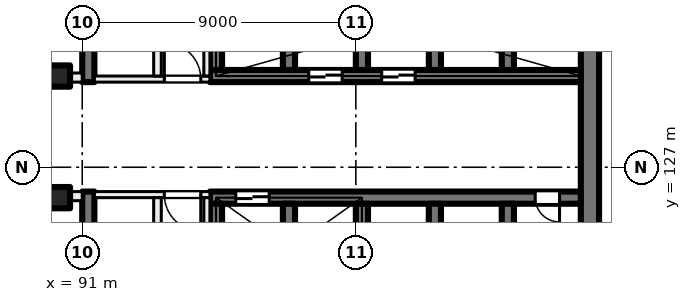
"""IFC4 building model, lengths in metres.
Left out: names, types, materials, properties, quantities, classifications, styles, units other than length and angle.
Written with IfcOpenShell. Run it as: python <this file> out.ifc"""

import sys

from ifc_helpers import new_model, si_unit, direction, frame, frame_2d, origin, origin_2d, place, context, subcontext, project, spatial, rectangle, extrude, element, fill, save


model = new_model("IFC4")
c1 = context("Model", 3, precision=1e-05, world=origin(), true_north=direction((0.0, 1.0)))
c2 = subcontext(c1, "Body", "Model", "MODEL_VIEW")
j1 = project(units=[si_unit("LENGTHUNIT", "METRE"), si_unit("PLANEANGLEUNIT", "RADIAN")], contexts=[c1])
p1 = place(None, origin())
s1 = spatial("IfcSite", under=j1, at=p1, CompositionType="ELEMENT")
p2 = place(p1, origin())
s2 = spatial("IfcBuilding", under=s1, at=p2, CompositionType="ELEMENT")
p3 = place(p2, frame((0.0, 0.0, 27.5)))
s3 = spatial("IfcBuildingStorey", under=s2, at=p3, CompositionType="ELEMENT", Elevation=27.5)
for number, where, z_axis, x_axis in (
    (1, (90.25, 130.0, 0.0), (0.0, 0.0, 1.0), (1.0, 0.0, 0.0)),
    (2, (90.25, 126.0, 0.0), (0.0, 0.0, 1.0), (1.0, 0.0, 0.0)),
):
    element("IfcColumn", number, at=place(p3, frame(where, z_axis=z_axis, x_axis=x_axis)), inside=s3, PredefinedType="COLUMN", context=c2, shape_type="SweptSolid", body=[
        extrude(rectangle(XDim=0.7, YDim=0.7, at=origin_2d()), origin(), (0.0, 0.0, 1.0), 4.0),
    ])
p4 = place(p3, frame((107.7, 135.2, 0.0), z_axis=(0.0, 0.0, 1.0), x_axis=(0.0, -1.0, 0.0)))
e3 = element("IfcWall", 3, at=p4, inside=s3, PredefinedType="SHEAR", context=c2, shape_type="SweptSolid", body=[
    extrude(rectangle(XDim=14.4, YDim=0.6, at=frame_2d((7.2, 0.0))), origin(), (0.0, 0.0, 1.0), 4.0),
])
p5 = place(p3, frame((107.4, 130.0, 0.0), z_axis=(0.0, 0.0, 1.0), x_axis=(-1.0, 0.0, 0.0)))
e4 = element("IfcWall", 4, at=p5, inside=s3, PredefinedType="SHEAR", context=c2, shape_type="SweptSolid", body=[
    extrude(rectangle(XDim=12.2, YDim=0.4, at=frame_2d((6.1, 0.0))), origin(), (0.0, 0.0, 1.0), 4.0),
])
p6 = place(p5, frame((5.45, 0.0, 0.0)))
e5 = element("IfcOpeningElement", 5, at=p6, cuts=e4, PredefinedType="OPENING", context=c2, shape_type="SweptSolid", body=[
    extrude(rectangle(XDim=1.1, YDim=2.1, at=frame_2d((0.55, 1.05))), frame((0.0, 0.21, 0.0), z_axis=(0.0, -1.0, 0.0), x_axis=(1.0, 0.0, 0.0)), (0.0, 0.0, 1.0), 0.42),
])
p7 = place(p5, frame((7.85, 0.0, 0.0)))
e6 = element("IfcOpeningElement", 6, at=p7, cuts=e4, PredefinedType="OPENING", context=c2, shape_type="SweptSolid", body=[
    extrude(rectangle(XDim=1.1, YDim=2.1, at=frame_2d((0.55, 1.05))), frame((0.0, 0.21, 0.0), z_axis=(0.0, -1.0, 0.0), x_axis=(1.0, 0.0, 0.0)), (0.0, 0.0, 1.0), 0.42),
])
for number, where, z_axis, x_axis in (
    (7, (105.0, 133.2, 0.0), (0.0, 0.0, 1.0), (0.0, -1.0, 0.0)),
    (8, (102.6, 133.2, 0.0), (0.0, 0.0, 1.0), (0.0, -1.0, 0.0)),
    (9, (100.2, 133.2, 0.0), (0.0, 0.0, 1.0), (0.0, -1.0, 0.0)),
    (10, (97.8, 133.2, 0.0), (0.0, 0.0, 1.0), (0.0, -1.0, 0.0)),
    (11, (95.4, 133.2, 0.0), (0.0, 0.0, 1.0), (0.0, -1.0, 0.0)),
):
    element("IfcWall", number, at=place(p3, frame(where, z_axis=z_axis, x_axis=x_axis)), inside=s3, PredefinedType="SHEAR", context=c2, shape_type="SweptSolid", body=[
        extrude(rectangle(XDim=3.0, YDim=0.4, at=frame_2d((1.5, 0.0))), origin(), (0.0, 0.0, 1.0), 4.0),
    ])
p8 = place(p3, frame((107.4, 126.0, 0.0), z_axis=(0.0, 0.0, 1.0), x_axis=(-1.0, 0.0, 0.0)))
e12 = element("IfcWall", 12, at=p8, inside=s3, PredefinedType="SHEAR", context=c2, shape_type="SweptSolid", body=[
    extrude(rectangle(XDim=12.2, YDim=0.4, at=frame_2d((6.1, 0.0))), origin(), (0.0, 0.0, 1.0), 4.0),
])
p9 = place(p8, frame((10.25, 0.0, 0.0)))
e13 = element("IfcOpeningElement", 13, at=p9, cuts=e12, PredefinedType="OPENING", context=c2, shape_type="SweptSolid", body=[
    extrude(rectangle(XDim=1.1, YDim=2.1, at=frame_2d((0.55, 1.05))), frame((0.0, 0.21, 0.0), z_axis=(0.0, -1.0, 0.0), x_axis=(1.0, 0.0, 0.0)), (0.0, 0.0, 1.0), 0.42),
])
p10 = place(p8, frame((0.7, 0.0, 0.0)))
e14 = element("IfcOpeningElement", 14, at=p10, cuts=e12, PredefinedType="OPENING", context=c2, shape_type="SweptSolid", body=[
    extrude(rectangle(XDim=0.8, YDim=2.1, at=frame_2d((0.4, 1.05))), frame((0.0, 0.21, 0.0), z_axis=(0.0, -1.0, 0.0), x_axis=(1.0, 0.0, 0.0)), (0.0, 0.0, 1.0), 0.42),
])
for number, where, z_axis, x_axis in (
    (15, (105.0, 125.8, 0.0), (0.0, 0.0, 1.0), (0.0, -1.0, 0.0)),
    (16, (102.6, 125.8, 0.0), (0.0, 0.0, 1.0), (0.0, -1.0, 0.0)),
    (17, (100.2, 125.8, 0.0), (0.0, 0.0, 1.0), (0.0, -1.0, 0.0)),
    (18, (97.8, 125.8, 0.0), (0.0, 0.0, 1.0), (0.0, -1.0, 0.0)),
    (19, (95.4, 125.8, 0.0), (0.0, 0.0, 1.0), (0.0, -1.0, 0.0)),
):
    element("IfcWall", number, at=place(p3, frame(where, z_axis=z_axis, x_axis=x_axis)), inside=s3, PredefinedType="SHEAR", context=c2, shape_type="SweptSolid", body=[
        extrude(rectangle(XDim=3.0, YDim=0.4, at=frame_2d((1.5, 0.0))), origin(), (0.0, 0.0, 1.0), 4.0),
    ])
for number, where, z_axis, x_axis in (
    (20, (91.2, 138.4, 0.0), (0.0, 0.0, 1.0), (0.0, -1.0, 0.0)),
    (21, (91.2, 126.2, 0.0), (0.0, 0.0, 1.0), (0.0, -1.0, 0.0)),
):
    element("IfcWall", number, at=place(p3, frame(where, z_axis=z_axis, x_axis=x_axis)), inside=s3, PredefinedType="SHEAR", context=c2, shape_type="SweptSolid", body=[
        extrude(rectangle(XDim=8.6, YDim=0.4, at=frame_2d((4.3, 0.0))), origin(), (0.0, 0.0, 1.0), 4.0),
    ])
p11 = place(p3, frame((95.2, 126.1, 0.0), z_axis=(0.0, 0.0, 1.0), x_axis=(-1.0, 0.0, 0.0)))
e22 = element("IfcWall", 22, at=p11, inside=s3, PredefinedType="PARTITIONING", context=c2, shape_type="SweptSolid", body=[
    extrude(rectangle(XDim=3.8, YDim=0.2, at=frame_2d((1.9, 0.0))), origin(), (0.0, 0.0, 1.0), 3.625),
])
p12 = place(p11, frame((0.3, 0.0, 0.0)))
e23 = element("IfcOpeningElement", 23, at=p12, cuts=e22, PredefinedType="OPENING", context=c2, shape_type="SweptSolid", body=[
    extrude(rectangle(XDim=1.2, YDim=2.1, at=frame_2d((0.6, 1.05))), frame((0.0, 0.11, 0.0), z_axis=(0.0, -1.0, 0.0), x_axis=(1.0, 0.0, 0.0)), (0.0, 0.0, 1.0), 0.22),
])
p13 = place(p3, frame((95.1, 117.6, 0.0), z_axis=(0.0, 0.0, 1.0), x_axis=(0.0, 1.0, 0.0)))
e24 = element("IfcWall", 24, at=p13, inside=s3, PredefinedType="PARTITIONING", context=c2, shape_type="SweptSolid", body=[
    extrude(rectangle(XDim=8.4, YDim=0.2, at=frame_2d((4.2, 0.0))), origin(), (0.0, 0.0, 1.0), 3.625),
])
p14 = place(p13, frame((1.65, 0.0, 0.0)))
e25 = element("IfcOpeningElement", 25, at=p14, cuts=e24, PredefinedType="OPENING", context=c2, shape_type="SweptSolid", body=[
    extrude(rectangle(XDim=1.5, YDim=2.1, at=frame_2d((0.75, 1.05))), frame((0.0, 0.11, 0.0), z_axis=(0.0, -1.0, 0.0), x_axis=(1.0, 0.0, 0.0)), (0.0, 0.0, 1.0), 0.22),
])
p15 = place(p3, frame((93.475, 117.6, 0.0), z_axis=(0.0, 0.0, 1.0), x_axis=(0.0, 1.0, 0.0)))
e26 = element("IfcWall", 26, at=p15, inside=s3, PredefinedType="PARTITIONING", context=c2, shape_type="SweptSolid", body=[
    extrude(rectangle(XDim=8.4, YDim=0.25, at=frame_2d((4.2, 0.0))), origin(), (0.0, 0.0, 1.0), 3.625),
])
p16 = place(p15, frame((3.8, 0.0, 0.0)))
e27 = element("IfcOpeningElement", 27, at=p16, cuts=e26, PredefinedType="OPENING", context=c2, shape_type="SweptSolid", body=[
    extrude(rectangle(XDim=0.8, YDim=2.1, at=frame_2d((0.4, 1.05))), frame((0.0, 0.135, 0.0), z_axis=(0.0, -1.0, 0.0), x_axis=(1.0, 0.0, 0.0)), (0.0, 0.0, 1.0), 0.27),
])
p17 = place(p3, frame((91.4, 129.9, 0.0), z_axis=(0.0, 0.0, 1.0), x_axis=(1.0, 0.0, 0.0)))
e28 = element("IfcWall", 28, at=p17, inside=s3, PredefinedType="PARTITIONING", context=c2, shape_type="SweptSolid", body=[
    extrude(rectangle(XDim=3.8, YDim=0.2, at=frame_2d((1.9, 0.0))), origin(), (0.0, 0.0, 1.0), 3.625),
])
p18 = place(p17, frame((2.3, 0.0, 0.0)))
e29 = element("IfcOpeningElement", 29, at=p18, cuts=e28, PredefinedType="OPENING", context=c2, shape_type="SweptSolid", body=[
    extrude(rectangle(XDim=1.2, YDim=2.1, at=frame_2d((0.6, 1.05))), frame((0.0, 0.11, 0.0), z_axis=(0.0, -1.0, 0.0), x_axis=(1.0, 0.0, 0.0)), (0.0, 0.0, 1.0), 0.22),
])
p19 = place(p3, frame((95.1, 130.0, 0.0), z_axis=(0.0, 0.0, 1.0), x_axis=(0.0, 1.0, 0.0)))
e30 = element("IfcWall", 30, at=p19, inside=s3, PredefinedType="PARTITIONING", context=c2, shape_type="SweptSolid", body=[
    extrude(rectangle(XDim=8.4, YDim=0.2, at=frame_2d((4.2, 0.0))), origin(), (0.0, 0.0, 1.0), 3.625),
])
p20 = place(p19, frame((5.25, 0.0, 0.0)))
e31 = element("IfcOpeningElement", 31, at=p20, cuts=e30, PredefinedType="OPENING", context=c2, shape_type="SweptSolid", body=[
    extrude(rectangle(XDim=1.5, YDim=2.1, at=frame_2d((0.75, 1.05))), frame((0.0, 0.11, 0.0), z_axis=(0.0, -1.0, 0.0), x_axis=(1.0, 0.0, 0.0)), (0.0, 0.0, 1.0), 0.22),
])
p21 = place(p3, frame((93.475, 130.0, 0.0), z_axis=(0.0, 0.0, 1.0), x_axis=(0.0, 1.0, 0.0)))
e32 = element("IfcWall", 32, at=p21, inside=s3, PredefinedType="PARTITIONING", context=c2, shape_type="SweptSolid", body=[
    extrude(rectangle(XDim=8.4, YDim=0.25, at=frame_2d((4.2, 0.0))), origin(), (0.0, 0.0, 1.0), 3.625),
])
p22 = place(p21, frame((2.275, 0.0, 0.0)))
e33 = element("IfcOpeningElement", 33, at=p22, cuts=e32, PredefinedType="OPENING", context=c2, shape_type="SweptSolid", body=[
    extrude(rectangle(XDim=1.0, YDim=2.1, at=frame_2d((0.5, 1.05))), frame((0.0, 0.135, 0.0), z_axis=(0.0, -1.0, 0.0), x_axis=(1.0, 0.0, 0.0)), (0.0, 0.0, 1.0), 0.27),
])
p23 = place(p21, frame((6.525, 0.0, 0.0)))
e34 = element("IfcOpeningElement", 34, at=p23, cuts=e32, PredefinedType="OPENING", context=c2, shape_type="SweptSolid", body=[
    extrude(rectangle(XDim=1.0, YDim=2.1, at=frame_2d((0.5, 1.05))), frame((0.0, 0.135, 0.0), z_axis=(0.0, -1.0, 0.0), x_axis=(1.0, 0.0, 0.0)), (0.0, 0.0, 1.0), 0.27),
])
p24 = place(p3, frame((72.5, 129.95, 0.0), z_axis=(0.0, 0.0, 1.0), x_axis=(1.0, 0.0, 0.0)))
e35 = element("IfcWall", 35, at=p24, inside=s3, PredefinedType="PARTITIONING", context=c2, shape_type="SweptSolid", body=[
    extrude(rectangle(XDim=18.5, YDim=0.3, at=frame_2d((9.25, 0.0))), origin(), (0.0, 0.0, 1.0), 3.625),
])
p25 = place(p24, frame((9.85, 0.0, 0.0)))
e36 = element("IfcOpeningElement", 36, at=p25, cuts=e35, PredefinedType="OPENING", context=c2, shape_type="SweptSolid", body=[
    extrude(rectangle(XDim=0.8, YDim=2.1, at=frame_2d((0.4, 1.05))), frame((0.0, 0.16, 0.0), z_axis=(0.0, -1.0, 0.0), x_axis=(1.0, 0.0, 0.0)), (0.0, 0.0, 1.0), 0.32),
])
p26 = place(p24, frame((14.625, 0.0, 0.0)))
e37 = element("IfcOpeningElement", 37, at=p26, cuts=e35, PredefinedType="OPENING", context=c2, shape_type="SweptSolid", body=[
    extrude(rectangle(XDim=1.0, YDim=2.1, at=frame_2d((0.5, 1.05))), frame((0.0, 0.16, 0.0), z_axis=(0.0, -1.0, 0.0), x_axis=(1.0, 0.0, 0.0)), (0.0, 0.0, 1.0), 0.32),
])
p27 = place(p24, frame((6.0, 0.0, 0.0)))
e38 = element("IfcOpeningElement", 38, at=p27, cuts=e35, PredefinedType="OPENING", context=c2, shape_type="SweptSolid", body=[
    extrude(rectangle(XDim=1.0, YDim=2.1, at=frame_2d((0.5, 1.05))), frame((0.0, 0.16, 0.0), z_axis=(0.0, -1.0, 0.0), x_axis=(1.0, 0.0, 0.0)), (0.0, 0.0, 1.0), 0.32),
])
p28 = place(p24, frame((1.625, 0.0, 0.0)))
e39 = element("IfcOpeningElement", 39, at=p28, cuts=e35, PredefinedType="OPENING", context=c2, shape_type="SweptSolid", body=[
    extrude(rectangle(XDim=1.0, YDim=2.1, at=frame_2d((0.5, 1.05))), frame((0.0, 0.16, 0.0), z_axis=(0.0, -1.0, 0.0), x_axis=(1.0, 0.0, 0.0)), (0.0, 0.0, 1.0), 0.32),
])
p29 = place(p3, frame((91.0, 126.05, 0.0), z_axis=(0.0, 0.0, 1.0), x_axis=(-1.0, 0.0, 0.0)))
e40 = element("IfcWall", 40, at=p29, inside=s3, PredefinedType="PARTITIONING", context=c2, shape_type="SweptSolid", body=[
    extrude(rectangle(XDim=43.785, YDim=0.3, at=frame_2d((21.893, 0.0))), origin(), (0.0, 0.0, 1.0), 3.625),
])
p30 = place(p29, frame((2.125, 0.0, 0.0)))
e41 = element("IfcOpeningElement", 41, at=p30, cuts=e40, PredefinedType="OPENING", context=c2, shape_type="SweptSolid", body=[
    extrude(rectangle(XDim=1.0, YDim=2.1, at=frame_2d((0.5, 1.05))), frame((0.0, 0.16, 0.0), z_axis=(0.0, -1.0, 0.0), x_axis=(1.0, 0.0, 0.0)), (0.0, 0.0, 1.0), 0.32),
])
p31 = place(p29, frame((7.0, 0.0, 0.0)))
e42 = element("IfcOpeningElement", 42, at=p31, cuts=e40, PredefinedType="OPENING", context=c2, shape_type="SweptSolid", body=[
    extrude(rectangle(XDim=1.0, YDim=2.1, at=frame_2d((0.5, 1.05))), frame((0.0, 0.16, 0.0), z_axis=(0.0, -1.0, 0.0), x_axis=(1.0, 0.0, 0.0)), (0.0, 0.0, 1.0), 0.32),
])
p32 = place(p29, frame((11.5, 0.0, 0.0)))
e43 = element("IfcOpeningElement", 43, at=p32, cuts=e40, PredefinedType="OPENING", context=c2, shape_type="SweptSolid", body=[
    extrude(rectangle(XDim=1.0, YDim=2.1, at=frame_2d((0.5, 1.05))), frame((0.0, 0.16, 0.0), z_axis=(0.0, -1.0, 0.0), x_axis=(1.0, 0.0, 0.0)), (0.0, 0.0, 1.0), 0.32),
])
p33 = place(p29, frame((15.9, 0.0, 0.0)))
e44 = element("IfcOpeningElement", 44, at=p33, cuts=e40, PredefinedType="OPENING", context=c2, shape_type="SweptSolid", body=[
    extrude(rectangle(XDim=1.2, YDim=2.1, at=frame_2d((0.6, 1.05))), frame((0.0, 0.16, 0.0), z_axis=(0.0, -1.0, 0.0), x_axis=(1.0, 0.0, 0.0)), (0.0, 0.0, 1.0), 0.32),
])
p34 = place(p29, frame((22.35, 0.0, 0.0)))
e45 = element("IfcOpeningElement", 45, at=p34, cuts=e40, PredefinedType="OPENING", context=c2, shape_type="SweptSolid", body=[
    extrude(rectangle(XDim=1.8, YDim=2.1, at=frame_2d((0.9, 1.05))), frame((0.0, 0.16, 0.0), z_axis=(0.0, -1.0, 0.0), x_axis=(1.0, 0.0, 0.0)), (0.0, 0.0, 1.0), 0.32),
])
p35 = place(p29, frame((34.0, 0.0, 0.0)))
e46 = element("IfcOpeningElement", 46, at=p35, cuts=e40, PredefinedType="OPENING", context=c2, shape_type="SweptSolid", body=[
    extrude(rectangle(XDim=1.0, YDim=2.1, at=frame_2d((0.5, 1.05))), frame((0.0, 0.16, 0.0), z_axis=(0.0, -1.0, 0.0), x_axis=(1.0, 0.0, 0.0)), (0.0, 0.0, 1.0), 0.32),
])
p36 = place(p29, frame((39.296, 0.0, 0.0)))
e47 = element("IfcOpeningElement", 47, at=p36, cuts=e40, PredefinedType="OPENING", context=c2, shape_type="SweptSolid", body=[
    extrude(rectangle(XDim=1.8, YDim=2.1, at=frame_2d((0.9, 1.05))), frame((0.0, 0.16, 0.0), z_axis=(0.0, -1.0, 0.0), x_axis=(1.0, 0.0, 0.0)), (0.0, 0.0, 1.0), 0.32),
])
p37 = place(p9, origin())
e48 = element("IfcDoor", 48, at=p37, inside=s3, OperationType="DOUBLE_DOOR_SLIDING", PredefinedType="DOOR", context=c2, shape_type="SweptSolid", body=[
    extrude(rectangle(XDim=1.1, YDim=2.1, at=frame_2d((0.55, 1.05))), frame((0.0, 0.025, 0.0), z_axis=(0.0, -1.0, 0.0), x_axis=(1.0, 0.0, 0.0)), (0.0, 0.0, 1.0), 0.05),
])
fill(e13, e48)
p38 = place(p6, origin())
e49 = element("IfcDoor", 49, at=p38, inside=s3, OperationType="DOUBLE_DOOR_SLIDING", PredefinedType="DOOR", context=c2, shape_type="SweptSolid", body=[
    extrude(rectangle(XDim=1.1, YDim=2.1, at=frame_2d((0.55, 1.05))), frame((0.0, 0.025, 0.0), z_axis=(0.0, -1.0, 0.0), x_axis=(1.0, 0.0, 0.0)), (0.0, 0.0, 1.0), 0.05),
])
fill(e5, e49)
p39 = place(p7, origin())
e50 = element("IfcDoor", 50, at=p39, inside=s3, OperationType="DOUBLE_DOOR_SLIDING", PredefinedType="DOOR", context=c2, shape_type="SweptSolid", body=[
    extrude(rectangle(XDim=1.1, YDim=2.1, at=frame_2d((0.55, 1.05))), frame((0.0, 0.025, 0.0), z_axis=(0.0, -1.0, 0.0), x_axis=(1.0, 0.0, 0.0)), (0.0, 0.0, 1.0), 0.05),
])
fill(e6, e50)
p40 = place(p10, origin())
e51 = element("IfcDoor", 51, at=p40, inside=s3, OperationType="SINGLE_SWING_LEFT", PredefinedType="DOOR", context=c2, shape_type="SweptSolid", body=[
    extrude(rectangle(XDim=0.8, YDim=2.1, at=frame_2d((0.4, 1.05))), frame((0.0, 0.025, 0.0), z_axis=(0.0, -1.0, 0.0), x_axis=(1.0, 0.0, 0.0)), (0.0, 0.0, 1.0), 0.05),
])
fill(e14, e51)
p41 = place(p12, origin())
e52 = element("IfcDoor", 52, at=p41, inside=s3, OperationType="DOUBLE_DOOR_SINGLE_SWING", PredefinedType="DOOR", context=c2, shape_type="SweptSolid", body=[
    extrude(rectangle(XDim=1.2, YDim=2.1, at=frame_2d((0.6, 1.05))), frame((0.0, 0.025, 0.0), z_axis=(0.0, -1.0, 0.0), x_axis=(1.0, 0.0, 0.0)), (0.0, 0.0, 1.0), 0.05),
])
fill(e23, e52)
p42 = place(p18, origin())
e53 = element("IfcDoor", 53, at=p42, inside=s3, OperationType="DOUBLE_DOOR_SINGLE_SWING", PredefinedType="DOOR", context=c2, shape_type="SweptSolid", body=[
    extrude(rectangle(XDim=1.2, YDim=2.1, at=frame_2d((0.6, 1.05))), frame((0.0, 0.025, 0.0), z_axis=(0.0, -1.0, 0.0), x_axis=(1.0, 0.0, 0.0)), (0.0, 0.0, 1.0), 0.05),
])
fill(e29, e53)
save(model, sys.argv[1])
